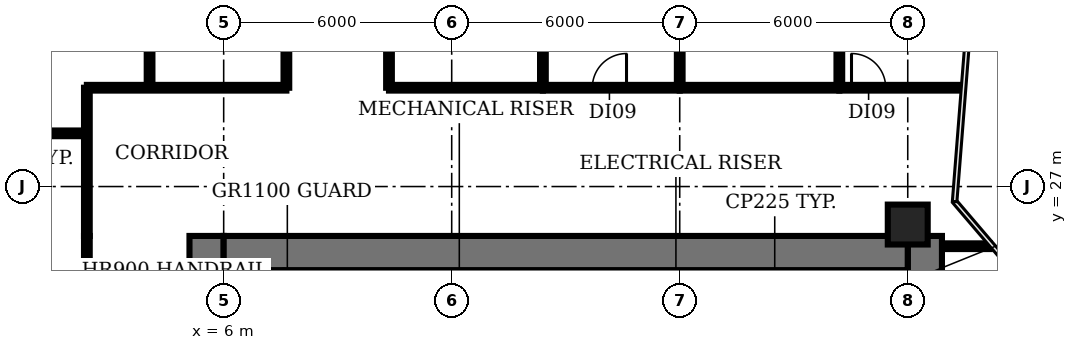
"""IFC4 building model, lengths in metres.
Left out: names, types, materials, properties, quantities, classifications, styles, units other than length and angle.
Written with IfcOpenShell. Run it as: python <this file> out.ifc"""

import sys

from ifc_helpers import new_model, si_unit, direction, frame, frame_2d, origin, origin_2d, place, context, subcontext, project, spatial, rectangle, circle, extrude, element, fill, save


model = new_model("IFC4")
c1 = context("Model", 3, precision=1e-05, world=origin(), true_north=direction((0.0, 1.0)))
c2 = subcontext(c1, "Body", "Model", "MODEL_VIEW")
j1 = project(units=[si_unit("LENGTHUNIT", "METRE"), si_unit("PLANEANGLEUNIT", "RADIAN")], contexts=[c1])
p1 = place(None, origin())
s1 = spatial("IfcSite", under=j1, at=p1, CompositionType="ELEMENT")
p2 = place(p1, origin())
s2 = spatial("IfcBuilding", under=s1, at=p2, CompositionType="ELEMENT")
p3 = place(p2, frame((0.0, 0.0, 33.2)))
s3 = spatial("IfcBuildingStorey", under=s2, at=p3, CompositionType="ELEMENT", Elevation=33.2)
p4 = place(p3, frame((24.0, 26.0, 0.0), z_axis=(0.0, 0.0, 1.0), x_axis=(1.0, 0.0, 0.0)))
e1 = element("IfcColumn", 1, at=p4, inside=s3, PredefinedType="COLUMN", context=c2, shape_type="SweptSolid", body=[
    extrude(circle(Radius=0.525, at=origin_2d()), origin(), (0.0, 0.0, 1.0), 3.85),
])
p5 = place(p3, frame((9.275, 18.375, 0.0), z_axis=(0.0, 0.0, 1.0), x_axis=(0.0, 1.0, 0.0)))
e2 = element("IfcWall", 2, at=p5, inside=s3, PredefinedType="SHEAR", context=c2, shape_type="SweptSolid", body=[
    extrude(rectangle(XDim=6.425, YDim=0.25, at=frame_2d((3.212, 0.0))), origin(), (0.0, 0.0, 1.0), 3.85),
])
for number, where, z_axis, x_axis in (
    (3, (15.1, 22.9, 0.0), (0.0, 0.0, 1.0), (0.0, 1.0, 0.0)),
    (4, (20.7, 22.9, 0.0), (0.0, 0.0, 1.0), (0.0, 1.0, 0.0)),
):
    element("IfcWall", number, at=place(p3, frame(where, z_axis=z_axis, x_axis=x_axis)), inside=s3, PredefinedType="SHEAR", context=c2, shape_type="SweptSolid", body=[
        extrude(rectangle(XDim=1.9, YDim=0.2, at=frame_2d((0.95, 0.0))), origin(), (0.0, 0.0, 1.0), 3.85),
    ])
p6 = place(p3, frame((5.55, 4.5, 0.0), z_axis=(0.0, 0.0, 1.0), x_axis=(0.0, 1.0, 0.0)))
e5 = element("IfcWall", 5, at=p6, inside=s3, PredefinedType="SHEAR", context=c2, shape_type="SweptSolid", body=[
    extrude(rectangle(XDim=21.2, YDim=0.9, at=frame_2d((10.6, 0.0))), origin(), (0.0, 0.0, 1.0), 3.85),
])
p7 = place(p6, frame((1.15, 0.0, 0.0)))
e6 = element("IfcOpeningElement", 6, at=p7, cuts=e5, PredefinedType="OPENING", context=c2, shape_type="SweptSolid", body=[
    extrude(rectangle(XDim=1.5, YDim=2.1, at=frame_2d((0.75, 1.05))), frame((0.0, 0.46, 0.0), z_axis=(0.0, -1.0, 0.0), x_axis=(1.0, 0.0, 0.0)), (0.0, 0.0, 1.0), 0.92),
])
p8 = place(p6, frame((7.6, 0.0, 0.0)))
e7 = element("IfcOpeningElement", 7, at=p8, cuts=e5, PredefinedType="OPENING", context=c2, shape_type="SweptSolid", body=[
    extrude(rectangle(XDim=1.2, YDim=2.1, at=frame_2d((0.6, 1.05))), frame((0.0, 0.46, 0.0), z_axis=(0.0, -1.0, 0.0), x_axis=(1.0, 0.0, 0.0)), (0.0, 0.0, 1.0), 0.92),
])
p9 = place(p6, frame((14.15, 0.0, 0.0)))
e8 = element("IfcOpeningElement", 8, at=p9, cuts=e5, PredefinedType="OPENING", context=c2, shape_type="SweptSolid", body=[
    extrude(rectangle(XDim=1.2, YDim=2.1, at=frame_2d((0.6, 1.05))), frame((0.0, 0.46, 0.0), z_axis=(0.0, -1.0, 0.0), x_axis=(1.0, 0.0, 0.0)), (0.0, 0.0, 1.0), 0.92),
])
p10 = place(p3, frame((24.45, 25.7, 0.0), z_axis=(0.0, 0.0, 1.0), x_axis=(0.0, -1.0, 0.0)))
e9 = element("IfcWall", 9, at=p10, inside=s3, PredefinedType="SHEAR", context=c2, shape_type="SweptSolid", body=[
    extrude(rectangle(XDim=21.2, YDim=0.9, at=frame_2d((10.6, 0.0))), origin(), (0.0, 0.0, 1.0), 3.85),
])
p11 = place(p10, frame((18.55, 0.0, 0.0)))
e10 = element("IfcOpeningElement", 10, at=p11, cuts=e9, PredefinedType="OPENING", context=c2, shape_type="SweptSolid", body=[
    extrude(rectangle(XDim=1.5, YDim=2.1, at=frame_2d((0.75, 1.05))), frame((0.0, 0.46, 0.0), z_axis=(0.0, -1.0, 0.0), x_axis=(1.0, 0.0, 0.0)), (0.0, 0.0, 1.0), 0.92),
])
p12 = place(p10, frame((12.45, 0.0, 0.0)))
e11 = element("IfcOpeningElement", 11, at=p12, cuts=e9, PredefinedType="OPENING", context=c2, shape_type="SweptSolid", body=[
    extrude(rectangle(XDim=0.9, YDim=2.1, at=frame_2d((0.45, 1.05))), frame((0.0, 0.46, 0.0), z_axis=(0.0, -1.0, 0.0), x_axis=(1.0, 0.0, 0.0)), (0.0, 0.0, 1.0), 0.92),
])
p13 = place(p10, frame((6.45, 0.0, 0.0)))
e12 = element("IfcOpeningElement", 12, at=p13, cuts=e9, PredefinedType="OPENING", context=c2, shape_type="SweptSolid", body=[
    extrude(rectangle(XDim=2.0, YDim=2.1, at=frame_2d((1.0, 1.05))), frame((0.0, 0.46, 0.0), z_axis=(0.0, -1.0, 0.0), x_axis=(1.0, 0.0, 0.0)), (0.0, 0.0, 1.0), 0.92),
])
p14 = place(p3, frame((6.0, 25.25, 0.0), z_axis=(0.0, 0.0, 1.0), x_axis=(1.0, 0.0, 0.0)))
e13 = element("IfcWall", 13, at=p14, inside=s3, PredefinedType="SHEAR", context=c2, shape_type="SweptSolid", body=[
    extrude(rectangle(XDim=18.0, YDim=0.9, at=frame_2d((9.0, 0.0))), origin(), (0.0, 0.0, 1.0), 3.85),
])
p15 = place(p3, frame((-1.01, 28.4, 0.0), z_axis=(0.0, 0.0, 1.0), x_axis=(1.0, 0.0, 0.0)))
e14 = element("IfcWall", 14, at=p15, inside=s3, PredefinedType="PARTITIONING", context=c2, shape_type="SweptSolid", body=[
    extrude(rectangle(XDim=3.41, YDim=0.15, at=frame_2d((1.705, 0.0))), origin(), (0.0, 0.0, 1.0), 2.83),
])
p16 = place(p3, frame((2.4, 4.5, 0.0), z_axis=(0.0, 0.0, 1.0), x_axis=(0.0, 1.0, 0.0)))
e15 = element("IfcWall", 15, at=p16, inside=s3, PredefinedType="PARTITIONING", context=c2, shape_type="SweptSolid", body=[
    extrude(rectangle(XDim=21.2, YDim=0.15, at=frame_2d((10.6, 0.0))), origin(), (0.0, 0.0, 1.0), 2.83),
])
p17 = place(p16, frame((10.8, 0.0, 0.0)))
e16 = element("IfcOpeningElement", 16, at=p17, cuts=e15, PredefinedType="OPENING", context=c2, shape_type="SweptSolid", body=[
    extrude(rectangle(XDim=1.2, YDim=2.1, at=frame_2d((0.6, 1.05))), frame((0.0, 0.085, 0.0), z_axis=(0.0, -1.0, 0.0), x_axis=(1.0, 0.0, 0.0)), (0.0, 0.0, 1.0), 0.17),
])
p18 = place(p3, frame((2.4, 25.7, 0.0), z_axis=(0.0, 0.0, 1.0), x_axis=(0.0, 1.0, 0.0)))
e17 = element("IfcWall", 17, at=p18, inside=s3, PredefinedType="PARTITIONING", context=c2, shape_type="SweptSolid", body=[
    extrude(rectangle(XDim=3.9, YDim=0.15, at=frame_2d((1.95, 0.0))), origin(), (0.0, 0.0, 1.0), 2.83),
])
p19 = place(p3, frame((2.4, 29.6, 0.0), z_axis=(0.0, 0.0, 1.0), x_axis=(1.0, 0.0, 0.0)))
e18 = element("IfcWall", 18, at=p19, inside=s3, PredefinedType="PARTITIONING", context=c2, shape_type="SweptSolid", body=[
    extrude(rectangle(XDim=5.25, YDim=0.15, at=frame_2d((2.625, 0.0))), origin(), (0.0, 0.0, 1.0), 2.83),
])
p20 = place(p3, frame((4.05, 29.6, 0.0), z_axis=(0.0, 0.0, 1.0), x_axis=(0.0, 1.0, 0.0)))
e19 = element("IfcWall", 19, at=p20, inside=s3, PredefinedType="PARTITIONING", context=c2, shape_type="SweptSolid", body=[
    extrude(rectangle(XDim=4.8, YDim=0.15, at=frame_2d((2.4, 0.0))), origin(), (0.0, 0.0, 1.0), 2.83),
])
p21 = place(p3, frame((7.65, 29.6, 0.0), z_axis=(0.0, 0.0, 1.0), x_axis=(0.0, 1.0, 0.0)))
e20 = element("IfcWall", 20, at=p21, inside=s3, PredefinedType="PARTITIONING", context=c2, shape_type="SweptSolid", body=[
    extrude(rectangle(XDim=4.8, YDim=0.15, at=frame_2d((2.4, 0.0))), origin(), (0.0, 0.0, 1.0), 2.83),
])
p22 = place(p21, frame((3.7, 0.0, 0.0)))
e21 = element("IfcOpeningElement", 21, at=p22, cuts=e20, PredefinedType="OPENING", context=c2, shape_type="SweptSolid", body=[
    extrude(rectangle(XDim=0.9, YDim=2.1, at=frame_2d((0.45, 1.05))), frame((0.0, 0.085, 0.0), z_axis=(0.0, -1.0, 0.0), x_axis=(1.0, 0.0, 0.0)), (0.0, 0.0, 1.0), 0.17),
])
p23 = place(p3, frame((10.35, 29.6, 0.0), z_axis=(0.0, 0.0, 1.0), x_axis=(0.0, 1.0, 0.0)))
e22 = element("IfcWall", 22, at=p23, inside=s3, PredefinedType="PARTITIONING", context=c2, shape_type="SweptSolid", body=[
    extrude(rectangle(XDim=4.8, YDim=0.15, at=frame_2d((2.4, 0.0))), origin(), (0.0, 0.0, 1.0), 2.83),
])
p24 = place(p3, frame((10.35, 29.6, 0.0), z_axis=(0.0, 0.0, 1.0), x_axis=(1.0, 0.0, 0.0)))
e23 = element("IfcWall", 23, at=p24, inside=s3, PredefinedType="PARTITIONING", context=c2, shape_type="SweptSolid", body=[
    extrude(rectangle(XDim=4.05, YDim=0.15, at=frame_2d((2.025, 0.0))), origin(), (0.0, 0.0, 1.0), 2.83),
])
p25 = place(p3, frame((14.4, 29.6, 0.0), z_axis=(0.0, 0.0, 1.0), x_axis=(0.0, 1.0, 0.0)))
e24 = element("IfcWall", 24, at=p25, inside=s3, PredefinedType="PARTITIONING", context=c2, shape_type="SweptSolid", body=[
    extrude(rectangle(XDim=4.8, YDim=0.15, at=frame_2d((2.4, 0.0))), origin(), (0.0, 0.0, 1.0), 2.83),
])
p26 = place(p3, frame((14.4, 29.6, 0.0), z_axis=(0.0, 0.0, 1.0), x_axis=(1.0, 0.0, 0.0)))
e25 = element("IfcWall", 25, at=p26, inside=s3, PredefinedType="PARTITIONING", context=c2, shape_type="SweptSolid", body=[
    extrude(rectangle(XDim=3.6, YDim=0.15, at=frame_2d((1.8, 0.0))), origin(), (0.0, 0.0, 1.0), 2.83),
])
p27 = place(p26, frame((1.3, 0.0, 0.0)))
e26 = element("IfcOpeningElement", 26, at=p27, cuts=e25, PredefinedType="OPENING", context=c2, shape_type="SweptSolid", body=[
    extrude(rectangle(XDim=0.9, YDim=2.1, at=frame_2d((0.45, 1.05))), frame((0.0, 0.085, 0.0), z_axis=(0.0, -1.0, 0.0), x_axis=(1.0, 0.0, 0.0)), (0.0, 0.0, 1.0), 0.17),
])
p28 = place(p3, frame((18.0, 29.6, 0.0), z_axis=(0.0, 0.0, 1.0), x_axis=(0.0, 1.0, 0.0)))
e27 = element("IfcWall", 27, at=p28, inside=s3, PredefinedType="PARTITIONING", context=c2, shape_type="SweptSolid", body=[
    extrude(rectangle(XDim=4.8, YDim=0.15, at=frame_2d((2.4, 0.0))), origin(), (0.0, 0.0, 1.0), 2.83),
])
p29 = place(p3, frame((18.0, 29.6, 0.0), z_axis=(0.0, 0.0, 1.0), x_axis=(1.0, 0.0, 0.0)))
e28 = element("IfcWall", 28, at=p29, inside=s3, PredefinedType="PARTITIONING", context=c2, shape_type="SweptSolid", body=[
    extrude(rectangle(XDim=4.2, YDim=0.15, at=frame_2d((2.1, 0.0))), origin(), (0.0, 0.0, 1.0), 2.83),
])
p30 = place(p3, frame((22.2, 29.6, 0.0), z_axis=(0.0, 0.0, 1.0), x_axis=(0.0, 1.0, 0.0)))
e29 = element("IfcWall", 29, at=p30, inside=s3, PredefinedType="PARTITIONING", context=c2, shape_type="SweptSolid", body=[
    extrude(rectangle(XDim=4.8, YDim=0.15, at=frame_2d((2.4, 0.0))), origin(), (0.0, 0.0, 1.0), 2.83),
])
p31 = place(p3, frame((22.2, 29.6, 0.0), z_axis=(0.0, 0.0, 1.0), x_axis=(1.0, 0.0, 0.0)))
e30 = element("IfcWall", 30, at=p31, inside=s3, PredefinedType="PARTITIONING", context=c2, shape_type="SweptSolid", body=[
    extrude(rectangle(XDim=3.22, YDim=0.15, at=frame_2d((1.61, 0.0))), origin(), (0.0, 0.0, 1.0), 2.83),
])
p32 = place(p31, frame((0.32, 0.0, 0.0)))
e31 = element("IfcOpeningElement", 31, at=p32, cuts=e30, PredefinedType="OPENING", context=c2, shape_type="SweptSolid", body=[
    extrude(rectangle(XDim=0.9, YDim=2.1, at=frame_2d((0.45, 1.05))), frame((0.0, 0.085, 0.0), z_axis=(0.0, -1.0, 0.0), x_axis=(1.0, 0.0, 0.0)), (0.0, 0.0, 1.0), 0.17),
])
p33 = place(p3, frame((25.0, 25.43, 0.0), z_axis=(0.0, 0.0, 1.0), x_axis=(1.0, 0.0, 0.0)))
e32 = element("IfcWall", 32, at=p33, inside=s3, PredefinedType="PARTITIONING", context=c2, shape_type="SweptSolid", body=[
    extrude(rectangle(XDim=1.158, YDim=0.15, at=frame_2d((0.579, 0.0))), origin(), (0.0, 0.0, 1.0), 2.83),
])
p34 = place(p27, origin())
e33 = element("IfcDoor", 33, at=p34, inside=s3, OperationType="SINGLE_SWING_RIGHT", PredefinedType="DOOR", context=c2, shape_type="SweptSolid", body=[
    extrude(rectangle(XDim=0.9, YDim=2.1, at=frame_2d((0.45, 1.05))), frame((0.0, 0.025, 0.0), z_axis=(0.0, -1.0, 0.0), x_axis=(1.0, 0.0, 0.0)), (0.0, 0.0, 1.0), 0.05),
])
fill(e26, e33)
p35 = place(p32, origin())
e34 = element("IfcDoor", 34, at=p35, inside=s3, OperationType="SINGLE_SWING_LEFT", PredefinedType="DOOR", context=c2, shape_type="SweptSolid", body=[
    extrude(rectangle(XDim=0.9, YDim=2.1, at=frame_2d((0.45, 1.05))), frame((0.0, 0.025, 0.0), z_axis=(0.0, -1.0, 0.0), x_axis=(1.0, 0.0, 0.0)), (0.0, 0.0, 1.0), 0.05),
])
fill(e31, e34)
save(model, sys.argv[1])
